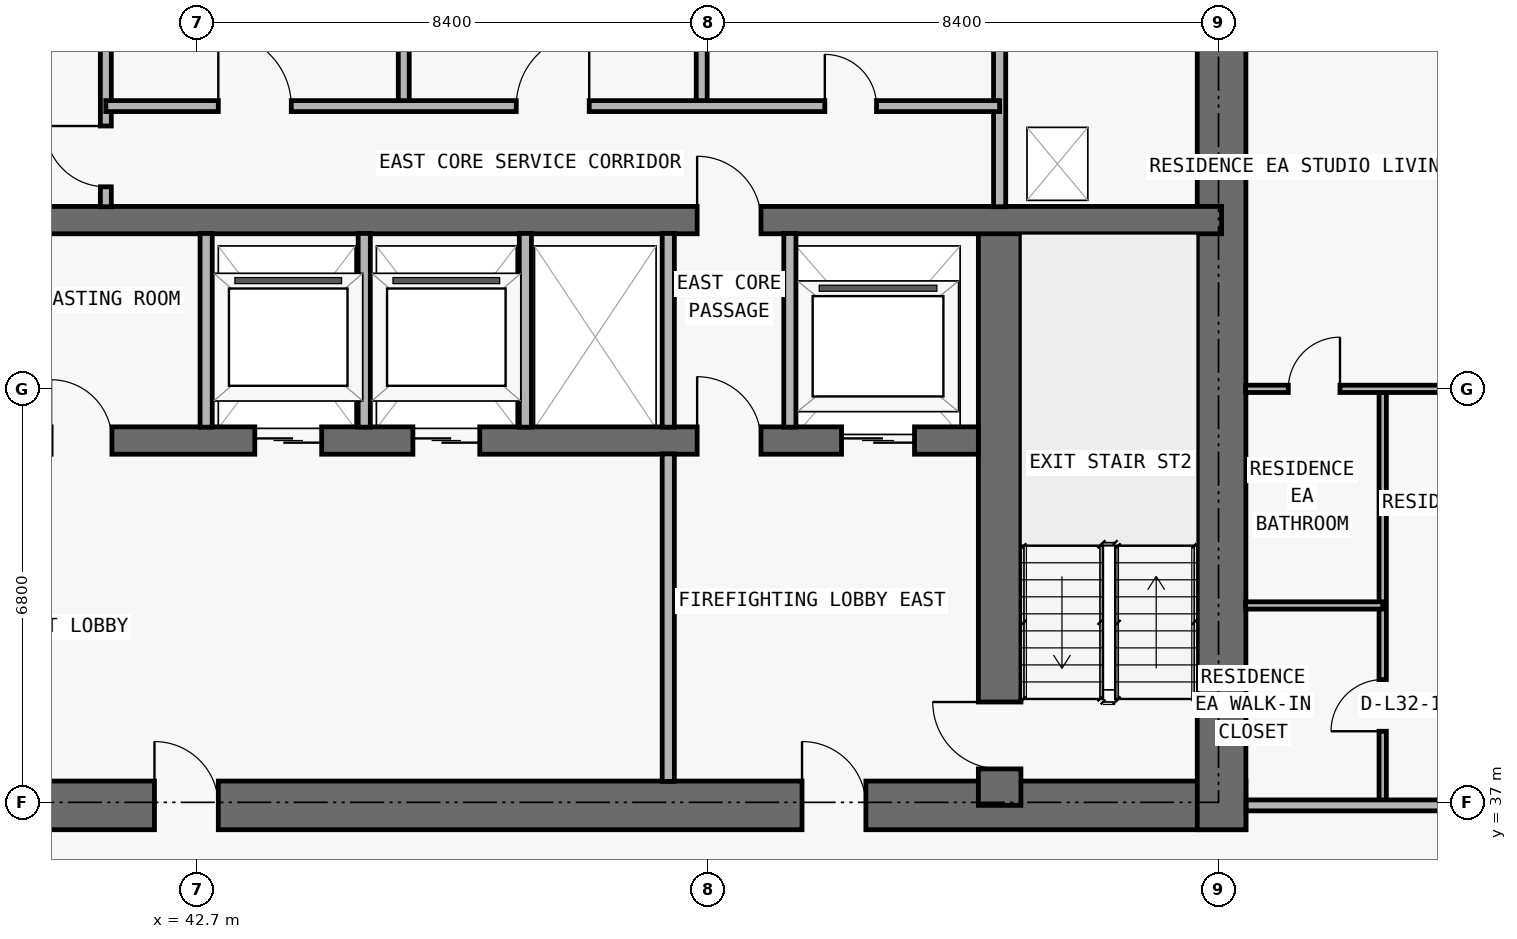
"""IFC4 building model, lengths in metres.
Left out: names, types, materials, properties, quantities, classifications, styles, units other than length and angle.
Written with IfcOpenShell. Run it as: python <this file> out.ifc"""

import sys

from ifc_helpers import new_model, si_unit, direction, frame, frame_2d, origin, place, context, subcontext, project, spatial, rectangle, extrude, element, fill, save


model = new_model("IFC4")
c1 = context("Model", 3, precision=1e-05, world=origin(), true_north=direction((0.0, 1.0)))
c2 = subcontext(c1, "Body", "Model", "MODEL_VIEW")
j1 = project(units=[si_unit("LENGTHUNIT", "METRE"), si_unit("PLANEANGLEUNIT", "RADIAN")], contexts=[c1])
p1 = place(None, origin())
s1 = spatial("IfcSite", under=j1, at=p1, CompositionType="ELEMENT")
p2 = place(p1, origin())
s2 = spatial("IfcBuilding", under=s1, at=p2, CompositionType="ELEMENT")
p3 = place(p2, frame((0.0, 0.0, 119.1)))
s3 = spatial("IfcBuildingStorey", under=s2, at=p3, CompositionType="ELEMENT", Elevation=119.1)
p4 = place(p3, frame((17.85, 36.95, 0.0), z_axis=(0.0, 0.0, 1.0), x_axis=(1.0, 0.0, 0.0)))
e1 = element("IfcWall", 1, at=p4, inside=s3, PredefinedType="SHEAR", context=c2, shape_type="SweptSolid", body=[
    extrude(rectangle(XDim=42.1, YDim=0.8, at=frame_2d((21.05, 0.0))), origin(), (0.0, 0.0, 1.0), 3.05),
])
p5 = place(p4, frame((14.45, 0.0, 0.0)))
e2 = element("IfcOpeningElement", 2, at=p5, cuts=e1, PredefinedType="OPENING", context=c2, shape_type="SweptSolid", body=[
    extrude(rectangle(XDim=1.1, YDim=2.15, at=frame_2d((0.55, 1.075))), frame((0.0, 0.41, 0.0), z_axis=(0.0, -1.0, 0.0), x_axis=(1.0, 0.0, 0.0)), (0.0, 0.0, 1.0), 0.82),
])
p6 = place(p4, frame((6.3, 0.0, 0.0)))
e3 = element("IfcOpeningElement", 3, at=p6, cuts=e1, PredefinedType="OPENING", context=c2, shape_type="SweptSolid", body=[
    extrude(rectangle(XDim=1.05, YDim=2.15, at=frame_2d((0.525, 1.075))), frame((0.0, 0.41, 0.0), z_axis=(0.0, -1.0, 0.0), x_axis=(1.0, 0.0, 0.0)), (0.0, 0.0, 1.0), 0.82),
])
p7 = place(p4, frame((34.8, 0.0, 0.0)))
e4 = element("IfcOpeningElement", 4, at=p7, cuts=e1, PredefinedType="OPENING", context=c2, shape_type="SweptSolid", body=[
    extrude(rectangle(XDim=1.05, YDim=2.15, at=frame_2d((0.525, 1.075))), frame((0.0, 0.41, 0.0), z_axis=(0.0, -1.0, 0.0), x_axis=(1.0, 0.0, 0.0)), (0.0, 0.0, 1.0), 0.82),
])
p8 = place(p4, frame((10.913, 0.0, 0.0)))
e5 = element("IfcOpeningElement", 5, at=p8, cuts=e1, PredefinedType="OPENING", context=c2, shape_type="SweptSolid", body=[
    extrude(rectangle(XDim=1.05, YDim=2.15, at=frame_2d((0.525, 1.075))), frame((0.0, 0.41, 0.0), z_axis=(0.0, -1.0, 0.0), x_axis=(1.0, 0.0, 0.0)), (0.0, 0.0, 1.0), 0.82),
])
p9 = place(p4, frame((24.15, 0.0, 0.0)))
e6 = element("IfcOpeningElement", 6, at=p9, cuts=e1, PredefinedType="OPENING", context=c2, shape_type="SweptSolid", body=[
    extrude(rectangle(XDim=1.05, YDim=2.15, at=frame_2d((0.525, 1.075))), frame((0.0, 0.41, 0.0), z_axis=(0.0, -1.0, 0.0), x_axis=(1.0, 0.0, 0.0)), (0.0, 0.0, 1.0), 0.82),
])
p10 = place(p3, frame((59.55, 36.55, 0.0), z_axis=(0.0, 0.0, 1.0), x_axis=(0.0, 1.0, 0.0)))
e7 = element("IfcWall", 7, at=p10, inside=s3, PredefinedType="SHEAR", context=c2, shape_type="SweptSolid", body=[
    extrude(rectangle(XDim=14.05, YDim=0.8, at=frame_2d((7.025, 0.0))), origin(), (0.0, 0.0, 1.0), 3.05),
])
p11 = place(p3, frame((55.9, 36.95, 0.0), z_axis=(0.0, 0.0, 1.0), x_axis=(0.0, 1.0, 0.0)))
e8 = element("IfcWall", 8, at=p11, inside=s3, PredefinedType="SHEAR", context=c2, shape_type="SweptSolid", body=[
    extrude(rectangle(XDim=9.625, YDim=0.7, at=frame_2d((4.812, 0.0))), origin(), (0.0, 0.0, 1.0), 3.05),
])
p12 = place(p11, frame((0.6, 0.0, 0.0)))
e9 = element("IfcOpeningElement", 9, at=p12, cuts=e8, PredefinedType="OPENING", context=c2, shape_type="SweptSolid", body=[
    extrude(rectangle(XDim=1.1, YDim=2.15, at=frame_2d((0.55, 1.075))), frame((0.0, 0.36, 0.0), z_axis=(0.0, -1.0, 0.0), x_axis=(1.0, 0.0, 0.0)), (0.0, 0.0, 1.0), 0.72),
])
p13 = place(p3, frame((22.25, 42.95, 0.0), z_axis=(0.0, 0.0, 1.0), x_axis=(1.0, 0.0, 0.0)))
e10 = element("IfcWall", 10, at=p13, inside=s3, PredefinedType="SHEAR", context=c2, shape_type="SweptSolid", body=[
    extrude(rectangle(XDim=33.3, YDim=0.45, at=frame_2d((16.65, 0.0))), origin(), (0.0, 0.0, 1.0), 3.05),
])
p14 = place(p13, frame((1.05, 0.0, 0.0)))
e11 = element("IfcOpeningElement", 11, at=p14, cuts=e10, PredefinedType="OPENING", context=c2, shape_type="SweptSolid", body=[
    extrude(rectangle(XDim=1.2, YDim=2.2, at=frame_2d((0.6, 1.1))), frame((0.0, 0.235, 0.0), z_axis=(0.0, -1.0, 0.0), x_axis=(1.0, 0.0, 0.0)), (0.0, 0.0, 1.0), 0.47),
])
p15 = place(p13, frame((31.05, 0.0, 0.0)))
e12 = element("IfcOpeningElement", 12, at=p15, cuts=e10, PredefinedType="OPENING", context=c2, shape_type="SweptSolid", body=[
    extrude(rectangle(XDim=1.2, YDim=2.2, at=frame_2d((0.6, 1.1))), frame((0.0, 0.235, 0.0), z_axis=(0.0, -1.0, 0.0), x_axis=(1.0, 0.0, 0.0)), (0.0, 0.0, 1.0), 0.47),
])
p16 = place(p13, frame((21.4, 0.0, 0.0)))
e13 = element("IfcOpeningElement", 13, at=p16, cuts=e10, PredefinedType="OPENING", context=c2, shape_type="SweptSolid", body=[
    extrude(rectangle(XDim=1.1, YDim=2.2, at=frame_2d((0.55, 1.1))), frame((0.0, 0.235, 0.0), z_axis=(0.0, -1.0, 0.0), x_axis=(1.0, 0.0, 0.0)), (0.0, 0.0, 1.0), 0.47),
])
p17 = place(p13, frame((24.0, 0.0, 0.0)))
e14 = element("IfcOpeningElement", 14, at=p17, cuts=e10, PredefinedType="OPENING", context=c2, shape_type="SweptSolid", body=[
    extrude(rectangle(XDim=1.1, YDim=2.2, at=frame_2d((0.55, 1.1))), frame((0.0, 0.235, 0.0), z_axis=(0.0, -1.0, 0.0), x_axis=(1.0, 0.0, 0.0)), (0.0, 0.0, 1.0), 0.47),
])
p18 = place(p13, frame((3.625, 0.0, 0.0)))
e15 = element("IfcOpeningElement", 15, at=p18, cuts=e10, PredefinedType="OPENING", context=c2, shape_type="SweptSolid", body=[
    extrude(rectangle(XDim=1.05, YDim=2.15, at=frame_2d((0.525, 1.075))), frame((0.0, 0.235, 0.0), z_axis=(0.0, -1.0, 0.0), x_axis=(1.0, 0.0, 0.0)), (0.0, 0.0, 1.0), 0.47),
])
p19 = place(p13, frame((28.675, 0.0, 0.0)))
e16 = element("IfcOpeningElement", 16, at=p19, cuts=e10, PredefinedType="OPENING", context=c2, shape_type="SweptSolid", body=[
    extrude(rectangle(XDim=1.05, YDim=2.15, at=frame_2d((0.525, 1.075))), frame((0.0, 0.235, 0.0), z_axis=(0.0, -1.0, 0.0), x_axis=(1.0, 0.0, 0.0)), (0.0, 0.0, 1.0), 0.47),
])
p20 = place(p13, frame((13.925, 0.0, 0.0)))
e17 = element("IfcOpeningElement", 17, at=p20, cuts=e10, PredefinedType="OPENING", context=c2, shape_type="SweptSolid", body=[
    extrude(rectangle(XDim=1.0, YDim=2.2, at=frame_2d((0.5, 1.1))), frame((0.0, 0.235, 0.0), z_axis=(0.0, -1.0, 0.0), x_axis=(1.0, 0.0, 0.0)), (0.0, 0.0, 1.0), 0.47),
])
p21 = place(p13, frame((18.05, 0.0, 0.0)))
e18 = element("IfcOpeningElement", 18, at=p21, cuts=e10, PredefinedType="OPENING", context=c2, shape_type="SweptSolid", body=[
    extrude(rectangle(XDim=1.0, YDim=2.2, at=frame_2d((0.5, 1.1))), frame((0.0, 0.235, 0.0), z_axis=(0.0, -1.0, 0.0), x_axis=(1.0, 0.0, 0.0)), (0.0, 0.0, 1.0), 0.47),
])
p22 = place(p3, frame((18.25, 46.575, 0.0), z_axis=(0.0, 0.0, 1.0), x_axis=(1.0, 0.0, 0.0)))
e19 = element("IfcWall", 19, at=p22, inside=s3, PredefinedType="SHEAR", context=c2, shape_type="SweptSolid", body=[
    extrude(rectangle(XDim=41.3, YDim=0.45, at=frame_2d((20.65, 0.0))), origin(), (0.0, 0.0, 1.0), 3.05),
])
p23 = place(p22, frame((7.65, 0.0, 0.0)))
e20 = element("IfcOpeningElement", 20, at=p23, cuts=e19, PredefinedType="OPENING", context=c2, shape_type="SweptSolid", body=[
    extrude(rectangle(XDim=1.0, YDim=2.2, at=frame_2d((0.5, 1.1))), frame((0.0, 0.235, 0.0), z_axis=(0.0, -1.0, 0.0), x_axis=(1.0, 0.0, 0.0)), (0.0, 0.0, 1.0), 0.47),
])
p24 = place(p22, frame((32.675, 0.0, 0.0)))
e21 = element("IfcOpeningElement", 21, at=p24, cuts=e19, PredefinedType="OPENING", context=c2, shape_type="SweptSolid", body=[
    extrude(rectangle(XDim=1.05, YDim=2.15, at=frame_2d((0.525, 1.075))), frame((0.0, 0.235, 0.0), z_axis=(0.0, -1.0, 0.0), x_axis=(1.0, 0.0, 0.0)), (0.0, 0.0, 1.0), 0.47),
])
p25 = place(p3, frame((41.2, 46.795, 0.0), z_axis=(0.0, 0.0, 1.0), x_axis=(0.0, 1.0, 0.0)))
e22 = element("IfcWall", 22, at=p25, inside=s3, PredefinedType="PARTITIONING", context=c2, shape_type="SweptSolid", body=[
    extrude(rectangle(XDim=3.16, YDim=0.18, at=frame_2d((1.58, 0.0))), origin(), (0.0, 0.0, 1.0), 3.05),
])
p26 = place(p25, frame((0.327, 0.0, 0.0)))
e23 = element("IfcOpeningElement", 23, at=p26, cuts=e22, PredefinedType="OPENING", context=c2, shape_type="SweptSolid", body=[
    extrude(rectangle(XDim=1.0, YDim=2.2, at=frame_2d((0.5, 1.1))), frame((0.0, 0.1, 0.0), z_axis=(0.0, -1.0, 0.0), x_axis=(1.0, 0.0, 0.0)), (0.0, 0.0, 1.0), 0.2),
])
for number, where, z_axis, x_axis in (
    (24, (42.85, 43.17, 0.0), (0.0, 0.0, 1.0), (0.0, 1.0, 0.0)),
    (25, (45.45, 43.17, 0.0), (0.0, 0.0, 1.0), (0.0, 1.0, 0.0)),
):
    element("IfcWall", number, at=place(p3, frame(where, z_axis=z_axis, x_axis=x_axis)), inside=s3, PredefinedType="PARTITIONING", context=c2, shape_type="SweptSolid", body=[
        extrude(rectangle(XDim=3.185, YDim=0.2, at=frame_2d((1.593, 0.0))), origin(), (0.0, 0.0, 1.0), 3.05),
    ])
p27 = place(p3, frame((46.1, 48.45, 0.0), z_axis=(0.0, 0.0, 1.0), x_axis=(0.0, 1.0, 0.0)))
e26 = element("IfcWall", 26, at=p27, inside=s3, PredefinedType="PARTITIONING", context=c2, shape_type="SweptSolid", body=[
    extrude(rectangle(XDim=1.505, YDim=0.18, at=frame_2d((0.752, 0.0))), origin(), (0.0, 0.0, 1.0), 3.05),
])
p28 = place(p3, frame((48.1, 43.17, 0.0), z_axis=(0.0, 0.0, 1.0), x_axis=(0.0, 1.0, 0.0)))
e27 = element("IfcWall", 27, at=p28, inside=s3, PredefinedType="PARTITIONING", context=c2, shape_type="SweptSolid", body=[
    extrude(rectangle(XDim=3.185, YDim=0.2, at=frame_2d((1.593, 0.0))), origin(), (0.0, 0.0, 1.0), 3.05),
])
p29 = place(p3, frame((50.45, 37.345, 0.0), z_axis=(0.0, 0.0, 1.0), x_axis=(0.0, 1.0, 0.0)))
e28 = element("IfcWall", 28, at=p29, inside=s3, PredefinedType="PARTITIONING", context=c2, shape_type="SweptSolid", body=[
    extrude(rectangle(XDim=5.385, YDim=0.2, at=frame_2d((2.692, 0.0))), origin(), (0.0, 0.0, 1.0), 3.05),
])
p30 = place(p3, frame((50.45, 43.17, 0.0), z_axis=(0.0, 0.0, 1.0), x_axis=(0.0, 1.0, 0.0)))
e29 = element("IfcWall", 29, at=p30, inside=s3, PredefinedType="PARTITIONING", context=c2, shape_type="SweptSolid", body=[
    extrude(rectangle(XDim=3.185, YDim=0.2, at=frame_2d((1.593, 0.0))), origin(), (0.0, 0.0, 1.0), 3.05),
])
p31 = place(p3, frame((51.0, 48.45, 0.0), z_axis=(0.0, 0.0, 1.0), x_axis=(0.0, 1.0, 0.0)))
e30 = element("IfcWall", 30, at=p31, inside=s3, PredefinedType="PARTITIONING", context=c2, shape_type="SweptSolid", body=[
    extrude(rectangle(XDim=1.505, YDim=0.18, at=frame_2d((0.752, 0.0))), origin(), (0.0, 0.0, 1.0), 3.05),
])
p32 = place(p3, frame((52.45, 43.17, 0.0), z_axis=(0.0, 0.0, 1.0), x_axis=(0.0, 1.0, 0.0)))
e31 = element("IfcWall", 31, at=p32, inside=s3, PredefinedType="PARTITIONING", context=c2, shape_type="SweptSolid", body=[
    extrude(rectangle(XDim=3.185, YDim=0.2, at=frame_2d((1.593, 0.0))), origin(), (0.0, 0.0, 1.0), 3.05),
])
p33 = place(p3, frame((55.9, 46.795, 0.0), z_axis=(0.0, 0.0, 1.0), x_axis=(0.0, 1.0, 0.0)))
e32 = element("IfcWall", 32, at=p33, inside=s3, PredefinedType="PARTITIONING", context=c2, shape_type="SweptSolid", body=[
    extrude(rectangle(XDim=3.16, YDim=0.2, at=frame_2d((1.58, 0.0))), origin(), (0.0, 0.0, 1.0), 3.05),
])
p34 = place(p3, frame((62.2, 36.95, 0.0), z_axis=(0.0, 0.0, 1.0), x_axis=(0.0, 1.0, 0.0)))
e33 = element("IfcWall", 33, at=p34, inside=s3, PredefinedType="PARTITIONING", context=c2, shape_type="SweptSolid", body=[
    extrude(rectangle(XDim=6.85, YDim=0.12, at=frame_2d((3.425, 0.0))), origin(), (0.0, 0.0, 1.0), 2.499),
])
p35 = place(p34, frame((1.219, 0.0, 0.0)))
e34 = element("IfcOpeningElement", 34, at=p35, cuts=e33, PredefinedType="OPENING", context=c2, shape_type="SweptSolid", body=[
    extrude(rectangle(XDim=0.85, YDim=2.1, at=frame_2d((0.425, 1.05))), frame((0.0, 0.07, 0.0), z_axis=(0.0, -1.0, 0.0), x_axis=(1.0, 0.0, 0.0)), (0.0, 0.0, 1.0), 0.14),
])
p36 = place(p3, frame((59.955, 36.95, 0.0), z_axis=(0.0, 0.0, 1.0), x_axis=(1.0, 0.0, 0.0)))
e35 = element("IfcWall", 35, at=p36, inside=s3, PredefinedType="PARTITIONING", context=c2, shape_type="SweptSolid", body=[
    extrude(rectangle(XDim=10.145, YDim=0.18, at=frame_2d((5.073, 0.0))), origin(), (0.0, 0.0, 1.0), 3.05),
])
p37 = place(p36, frame((3.957, 0.0, 0.0)))
e36 = element("IfcOpeningElement", 36, at=p37, cuts=e35, PredefinedType="OPENING", context=c2, shape_type="SweptSolid", body=[
    extrude(rectangle(XDim=1.0, YDim=2.2, at=frame_2d((0.5, 1.1))), frame((0.0, 0.1, 0.0), z_axis=(0.0, -1.0, 0.0), x_axis=(1.0, 0.0, 0.0)), (0.0, 0.0, 1.0), 0.2),
])
p38 = place(p3, frame((59.945, 40.238, 0.0), z_axis=(0.0, 0.0, 1.0), x_axis=(1.0, 0.0, 0.0)))
e37 = element("IfcWall", 37, at=p38, inside=s3, PredefinedType="PARTITIONING", context=c2, shape_type="SweptSolid", body=[
    extrude(rectangle(XDim=2.255, YDim=0.12, at=frame_2d((1.127, 0.0))), origin(), (0.0, 0.0, 1.0), 3.05),
])
p39 = place(p3, frame((59.945, 43.8, 0.0), z_axis=(0.0, 0.0, 1.0), x_axis=(1.0, 0.0, 0.0)))
e38 = element("IfcWall", 38, at=p39, inside=s3, PredefinedType="PARTITIONING", context=c2, shape_type="SweptSolid", body=[
    extrude(rectangle(XDim=13.66, YDim=0.12, at=frame_2d((6.83, 0.0))), origin(), (0.0, 0.0, 1.0), 2.339),
])
p40 = place(p39, frame((4.017, 0.0, 0.0)))
e39 = element("IfcOpeningElement", 39, at=p40, cuts=e38, PredefinedType="OPENING", context=c2, shape_type="SweptSolid", body=[
    extrude(rectangle(XDim=0.9, YDim=2.15, at=frame_2d((0.45, 1.075))), frame((0.0, 0.07, 0.0), z_axis=(0.0, -1.0, 0.0), x_axis=(1.0, 0.0, 0.0)), (0.0, 0.0, 1.0), 0.14),
])
p41 = place(p39, frame((0.702, 0.0, 0.0)))
e40 = element("IfcOpeningElement", 40, at=p41, cuts=e38, PredefinedType="OPENING", context=c2, shape_type="SweptSolid", body=[
    extrude(rectangle(XDim=0.85, YDim=2.1, at=frame_2d((0.425, 1.05))), frame((0.0, 0.07, 0.0), z_axis=(0.0, -1.0, 0.0), x_axis=(1.0, 0.0, 0.0)), (0.0, 0.0, 1.0), 0.14),
])
p42 = place(p3, frame((41.2, 48.45, 0.0), z_axis=(0.0, 0.0, 1.0), x_axis=(1.0, 0.0, 0.0)))
e41 = element("IfcWall", 41, at=p42, inside=s3, PredefinedType="PARTITIONING", context=c2, shape_type="SweptSolid", body=[
    extrude(rectangle(XDim=14.7, YDim=0.18, at=frame_2d((7.35, 0.0))), origin(), (0.0, 0.0, 1.0), 3.05),
])
p43 = place(p42, frame((1.85, 0.0, 0.0)))
e42 = element("IfcOpeningElement", 42, at=p43, cuts=e41, PredefinedType="OPENING", context=c2, shape_type="SweptSolid", body=[
    extrude(rectangle(XDim=1.2, YDim=2.2, at=frame_2d((0.6, 1.1))), frame((0.0, 0.1, 0.0), z_axis=(0.0, -1.0, 0.0), x_axis=(1.0, 0.0, 0.0)), (0.0, 0.0, 1.0), 0.2),
])
p44 = place(p42, frame((6.75, 0.0, 0.0)))
e43 = element("IfcOpeningElement", 43, at=p44, cuts=e41, PredefinedType="OPENING", context=c2, shape_type="SweptSolid", body=[
    extrude(rectangle(XDim=1.2, YDim=2.2, at=frame_2d((0.6, 1.1))), frame((0.0, 0.1, 0.0), z_axis=(0.0, -1.0, 0.0), x_axis=(1.0, 0.0, 0.0)), (0.0, 0.0, 1.0), 0.2),
])
p45 = place(p42, frame((11.825, 0.0, 0.0)))
e44 = element("IfcOpeningElement", 44, at=p45, cuts=e41, PredefinedType="OPENING", context=c2, shape_type="SweptSolid", body=[
    extrude(rectangle(XDim=0.85, YDim=2.1, at=frame_2d((0.425, 1.05))), frame((0.0, 0.1, 0.0), z_axis=(0.0, -1.0, 0.0), x_axis=(1.0, 0.0, 0.0)), (0.0, 0.0, 1.0), 0.2),
])
p46 = place(p15, origin())
e45 = element("IfcDoor", 45, at=p46, inside=s3, OperationType="DOUBLE_DOOR_SLIDING", PredefinedType="DOOR", context=c2, shape_type="SweptSolid", body=[
    extrude(rectangle(XDim=1.2, YDim=2.2, at=frame_2d((0.6, 1.1))), frame((0.0, 0.025, 0.0), z_axis=(0.0, -1.0, 0.0), x_axis=(1.0, 0.0, 0.0)), (0.0, 0.0, 1.0), 0.05),
])
fill(e12, e45)
p47 = place(p16, origin())
e46 = element("IfcDoor", 46, at=p47, inside=s3, OperationType="DOUBLE_DOOR_SLIDING", PredefinedType="DOOR", context=c2, shape_type="SweptSolid", body=[
    extrude(rectangle(XDim=1.1, YDim=2.2, at=frame_2d((0.55, 1.1))), frame((0.0, 0.025, 0.0), z_axis=(0.0, -1.0, 0.0), x_axis=(1.0, 0.0, 0.0)), (0.0, 0.0, 1.0), 0.05),
])
fill(e13, e46)
p48 = place(p17, origin())
e47 = element("IfcDoor", 47, at=p48, inside=s3, OperationType="DOUBLE_DOOR_SLIDING", PredefinedType="DOOR", context=c2, shape_type="SweptSolid", body=[
    extrude(rectangle(XDim=1.1, YDim=2.2, at=frame_2d((0.55, 1.1))), frame((0.0, 0.025, 0.0), z_axis=(0.0, -1.0, 0.0), x_axis=(1.0, 0.0, 0.0)), (0.0, 0.0, 1.0), 0.05),
])
fill(e14, e47)
p49 = place(p7, origin())
e48 = element("IfcDoor", 48, at=p49, inside=s3, OperationType="SINGLE_SWING_LEFT", PredefinedType="DOOR", context=c2, shape_type="SweptSolid", body=[
    extrude(rectangle(XDim=1.05, YDim=2.15, at=frame_2d((0.525, 1.075))), frame((0.0, 0.025, 0.0), z_axis=(0.0, -1.0, 0.0), x_axis=(1.0, 0.0, 0.0)), (0.0, 0.0, 1.0), 0.05),
])
fill(e4, e48)
p50 = place(p12, origin())
e49 = element("IfcDoor", 49, at=p50, inside=s3, OperationType="SINGLE_SWING_RIGHT", PredefinedType="DOOR", context=c2, shape_type="SweptSolid", body=[
    extrude(rectangle(XDim=1.1, YDim=2.15, at=frame_2d((0.55, 1.075))), frame((0.0, 0.025, 0.0), z_axis=(0.0, -1.0, 0.0), x_axis=(1.0, 0.0, 0.0)), (0.0, 0.0, 1.0), 0.05),
])
fill(e9, e49)
p51 = place(p19, origin())
e50 = element("IfcDoor", 50, at=p51, inside=s3, OperationType="SINGLE_SWING_LEFT", PredefinedType="DOOR", context=c2, shape_type="SweptSolid", body=[
    extrude(rectangle(XDim=1.05, YDim=2.15, at=frame_2d((0.525, 1.075))), frame((0.0, 0.025, 0.0), z_axis=(0.0, -1.0, 0.0), x_axis=(1.0, 0.0, 0.0)), (0.0, 0.0, 1.0), 0.05),
])
fill(e16, e50)
p52 = place(p9, origin())
e51 = element("IfcDoor", 51, at=p52, inside=s3, OperationType="SINGLE_SWING_LEFT", PredefinedType="DOOR", context=c2, shape_type="SweptSolid", body=[
    extrude(rectangle(XDim=1.05, YDim=2.15, at=frame_2d((0.525, 1.075))), frame((0.0, 0.025, 0.0), z_axis=(0.0, -1.0, 0.0), x_axis=(1.0, 0.0, 0.0)), (0.0, 0.0, 1.0), 0.05),
])
fill(e6, e51)
p53 = place(p21, origin())
e52 = element("IfcDoor", 52, at=p53, inside=s3, OperationType="SINGLE_SWING_LEFT", PredefinedType="DOOR", context=c2, shape_type="SweptSolid", body=[
    extrude(rectangle(XDim=1.0, YDim=2.2, at=frame_2d((0.5, 1.1))), frame((0.0, 0.025, 0.0), z_axis=(0.0, -1.0, 0.0), x_axis=(1.0, 0.0, 0.0)), (0.0, 0.0, 1.0), 0.05),
])
fill(e18, e52)
p54 = place(p24, origin())
e53 = element("IfcDoor", 53, at=p54, inside=s3, OperationType="SINGLE_SWING_LEFT", PredefinedType="DOOR", context=c2, shape_type="SweptSolid", body=[
    extrude(rectangle(XDim=1.05, YDim=2.15, at=frame_2d((0.525, 1.075))), frame((0.0, 0.025, 0.0), z_axis=(0.0, -1.0, 0.0), x_axis=(1.0, 0.0, 0.0)), (0.0, 0.0, 1.0), 0.05),
])
fill(e21, e53)
p55 = place(p26, origin())
e54 = element("IfcDoor", 54, at=p55, inside=s3, OperationType="SINGLE_SWING_RIGHT", PredefinedType="DOOR", context=c2, shape_type="SweptSolid", body=[
    extrude(rectangle(XDim=1.0, YDim=2.2, at=frame_2d((0.5, 1.1))), frame((0.0, 0.025, 0.0), z_axis=(0.0, -1.0, 0.0), x_axis=(1.0, 0.0, 0.0)), (0.0, 0.0, 1.0), 0.05),
])
fill(e23, e54)
p56 = place(p43, origin())
e55 = element("IfcDoor", 55, at=p56, inside=s3, OperationType="SINGLE_SWING_LEFT", PredefinedType="DOOR", context=c2, shape_type="SweptSolid", body=[
    extrude(rectangle(XDim=1.2, YDim=2.2, at=frame_2d((0.6, 1.1))), frame((0.0, 0.025, 0.0), z_axis=(0.0, -1.0, 0.0), x_axis=(1.0, 0.0, 0.0)), (0.0, 0.0, 1.0), 0.05),
])
fill(e42, e55)
p57 = place(p44, origin())
e56 = element("IfcDoor", 56, at=p57, inside=s3, OperationType="SINGLE_SWING_RIGHT", PredefinedType="DOOR", context=c2, shape_type="SweptSolid", body=[
    extrude(rectangle(XDim=1.2, YDim=2.2, at=frame_2d((0.6, 1.1))), frame((0.0, 0.025, 0.0), z_axis=(0.0, -1.0, 0.0), x_axis=(1.0, 0.0, 0.0)), (0.0, 0.0, 1.0), 0.05),
])
fill(e43, e56)
p58 = place(p45, origin())
e57 = element("IfcDoor", 57, at=p58, inside=s3, OperationType="SINGLE_SWING_LEFT", PredefinedType="DOOR", context=c2, shape_type="SweptSolid", body=[
    extrude(rectangle(XDim=0.85, YDim=2.1, at=frame_2d((0.425, 1.05))), frame((0.0, 0.025, 0.0), z_axis=(0.0, -1.0, 0.0), x_axis=(1.0, 0.0, 0.0)), (0.0, 0.0, 1.0), 0.05),
])
fill(e44, e57)
p59 = place(p35, origin())
e58 = element("IfcDoor", 58, at=p59, inside=s3, OperationType="SINGLE_SWING_LEFT", PredefinedType="DOOR", context=c2, shape_type="SweptSolid", body=[
    extrude(rectangle(XDim=0.85, YDim=2.1, at=frame_2d((0.425, 1.05))), frame((0.0, 0.025, 0.0), z_axis=(0.0, -1.0, 0.0), x_axis=(1.0, 0.0, 0.0)), (0.0, 0.0, 1.0), 0.05),
])
fill(e34, e58)
p60 = place(p41, origin())
e59 = element("IfcDoor", 59, at=p60, inside=s3, OperationType="SINGLE_SWING_RIGHT", PredefinedType="DOOR", context=c2, shape_type="SweptSolid", body=[
    extrude(rectangle(XDim=0.85, YDim=2.1, at=frame_2d((0.425, 1.05))), frame((0.0, 0.025, 0.0), z_axis=(0.0, -1.0, 0.0), x_axis=(1.0, 0.0, 0.0)), (0.0, 0.0, 1.0), 0.05),
])
fill(e40, e59)
save(model, sys.argv[1])
